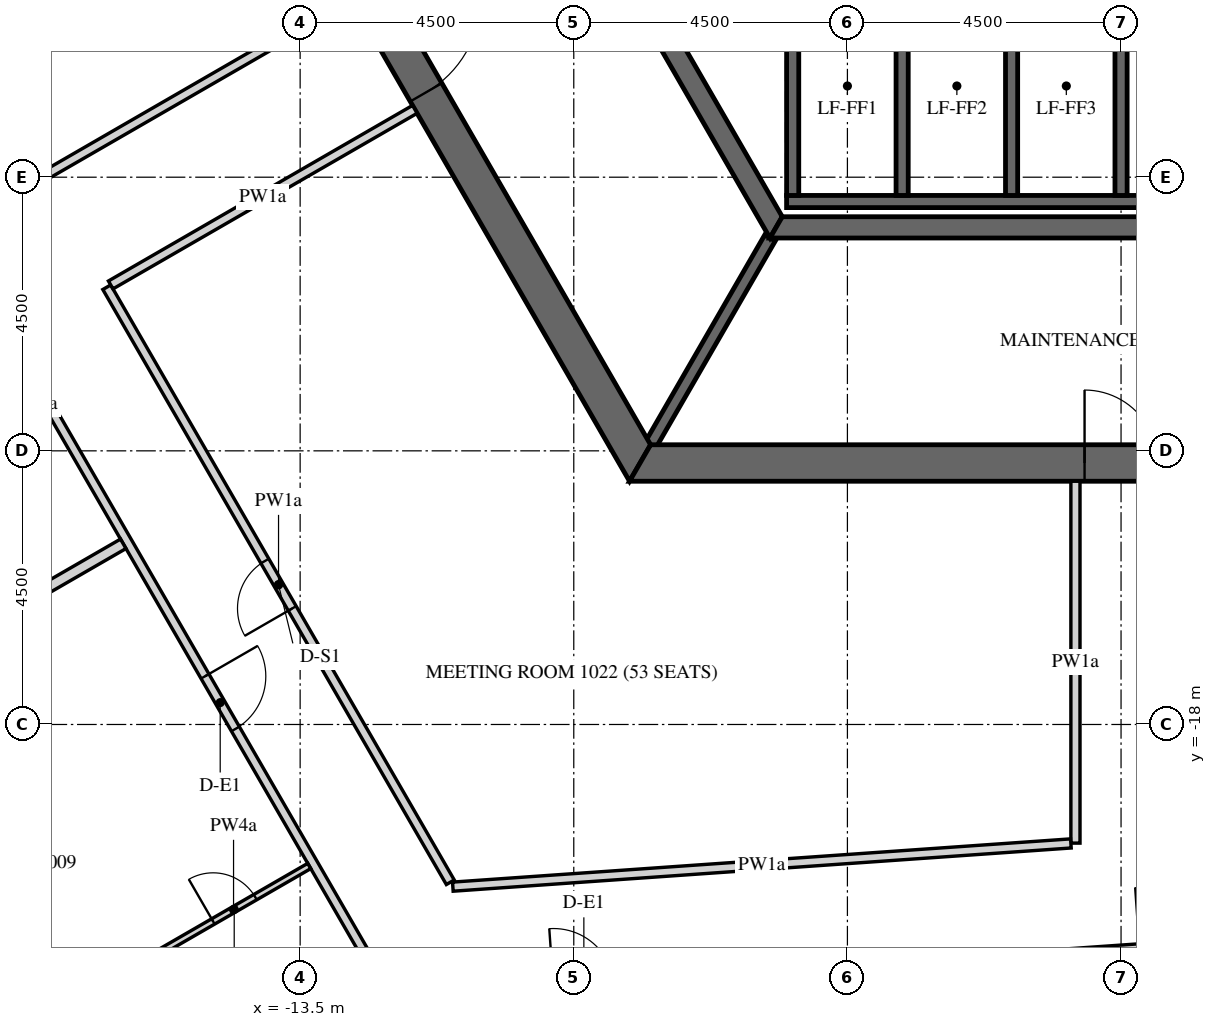
"""IFC4 building model, lengths in metres.
Left out: names, types, materials, properties, quantities, classifications, styles, units other than length and angle.
Written with IfcOpenShell. Run it as: python <this file> out.ifc"""

import sys

from ifc_helpers import new_model, si_unit, direction, frame, frame_2d, origin, place, context, subcontext, project, spatial, polyline, rectangle, outline, extrude, element, fill, save


model = new_model("IFC4")
c1 = context("Model", 3, precision=1e-05, world=origin(), true_north=direction((0.0, 1.0)))
c2 = subcontext(c1, "Body", "Model", "MODEL_VIEW")
j1 = project(units=[si_unit("LENGTHUNIT", "METRE"), si_unit("PLANEANGLEUNIT", "RADIAN")], contexts=[c1])
p1 = place(None, origin())
s1 = spatial("IfcSite", under=j1, at=p1, CompositionType="ELEMENT")
p2 = place(p1, origin())
s2 = spatial("IfcBuilding", under=s1, at=p2, CompositionType="ELEMENT")
p3 = place(p2, frame((0.0, 0.0, 142.8)))
s3 = spatial("IfcBuildingStorey", under=s2, at=p3, CompositionType="ELEMENT", Elevation=142.8)
p4 = place(p3, frame((-32.655, -2.89, -0.15), z_axis=(0.0, 0.0, 1.0), x_axis=(0.499997711317, -0.866026725152, 0.0)))
e1 = element("IfcWall", 1, at=p4, inside=s3, PredefinedType="SOLIDWALL", context=c2, shape_type="SweptSolid", body=[
    extrude(outline(polyline([(-0.022, -0.275), (30.097, -0.275), (30.045, 0.275), (0.022, 0.275), (-0.022, -0.275)])), origin(), (0.0, 0.0, 1.0), 3.75),
])
p5 = place(p4, frame((1.236, 0.0, 1.05)))
e2 = element("IfcOpeningElement", 2, at=p5, cuts=e1, PredefinedType="OPENING", context=c2, shape_type="SweptSolid", body=[
    extrude(rectangle(XDim=2.4, YDim=2.4, at=frame_2d((1.2, 1.2))), frame((0.0, 0.285, 0.0), z_axis=(0.0, -1.0, 0.0), x_axis=(1.0, 0.0, 0.0)), (0.0, 0.0, 1.0), 0.57),
])
p6 = place(p4, frame((4.835, 0.0, 1.05)))
e3 = element("IfcOpeningElement", 3, at=p6, cuts=e1, PredefinedType="OPENING", context=c2, shape_type="SweptSolid", body=[
    extrude(rectangle(XDim=2.4, YDim=2.4, at=frame_2d((1.2, 1.2))), frame((0.0, 0.285, 0.0), z_axis=(0.0, -1.0, 0.0), x_axis=(1.0, 0.0, 0.0)), (0.0, 0.0, 1.0), 0.57),
])
p7 = place(p4, frame((8.436, 0.0, 1.05)))
e4 = element("IfcOpeningElement", 4, at=p7, cuts=e1, PredefinedType="OPENING", context=c2, shape_type="SweptSolid", body=[
    extrude(rectangle(XDim=2.4, YDim=2.4, at=frame_2d((1.2, 1.2))), frame((0.0, 0.285, 0.0), z_axis=(0.0, -1.0, 0.0), x_axis=(1.0, 0.0, 0.0)), (0.0, 0.0, 1.0), 0.57),
])
p8 = place(p4, frame((12.035, 0.0, 1.05)))
e5 = element("IfcOpeningElement", 5, at=p8, cuts=e1, PredefinedType="OPENING", context=c2, shape_type="SweptSolid", body=[
    extrude(rectangle(XDim=2.4, YDim=2.4, at=frame_2d((1.2, 1.2))), frame((0.0, 0.285, 0.0), z_axis=(0.0, -1.0, 0.0), x_axis=(1.0, 0.0, 0.0)), (0.0, 0.0, 1.0), 0.57),
])
p9 = place(p4, frame((15.635, 0.0, 1.05)))
e6 = element("IfcOpeningElement", 6, at=p9, cuts=e1, PredefinedType="OPENING", context=c2, shape_type="SweptSolid", body=[
    extrude(rectangle(XDim=2.4, YDim=2.4, at=frame_2d((1.2, 1.2))), frame((0.0, 0.285, 0.0), z_axis=(0.0, -1.0, 0.0), x_axis=(1.0, 0.0, 0.0)), (0.0, 0.0, 1.0), 0.57),
])
p10 = place(p4, frame((19.236, 0.0, 1.05)))
e7 = element("IfcOpeningElement", 7, at=p10, cuts=e1, PredefinedType="OPENING", context=c2, shape_type="SweptSolid", body=[
    extrude(rectangle(XDim=2.4, YDim=2.4, at=frame_2d((1.2, 1.2))), frame((0.0, 0.285, 0.0), z_axis=(0.0, -1.0, 0.0), x_axis=(1.0, 0.0, 0.0)), (0.0, 0.0, 1.0), 0.57),
])
p11 = place(p4, frame((22.835, 0.0, 1.05)))
e8 = element("IfcOpeningElement", 8, at=p11, cuts=e1, PredefinedType="OPENING", context=c2, shape_type="SweptSolid", body=[
    extrude(rectangle(XDim=2.4, YDim=2.4, at=frame_2d((1.2, 1.2))), frame((0.0, 0.285, 0.0), z_axis=(0.0, -1.0, 0.0), x_axis=(1.0, 0.0, 0.0)), (0.0, 0.0, 1.0), 0.57),
])
p12 = place(p4, frame((26.436, 0.0, 1.05)))
e9 = element("IfcOpeningElement", 9, at=p12, cuts=e1, PredefinedType="OPENING", context=c2, shape_type="SweptSolid", body=[
    extrude(rectangle(XDim=2.4, YDim=2.4, at=frame_2d((1.2, 1.2))), frame((0.0, 0.285, 0.0), z_axis=(0.0, -1.0, 0.0), x_axis=(1.0, 0.0, 0.0)), (0.0, 0.0, 1.0), 0.57),
])
p13 = place(p3, frame((-15.819, 0.0, -0.15), z_axis=(0.0, 0.0, 1.0), x_axis=(0.499999880136, -0.866025472988, 0.0)))
e10 = element("IfcWall", 10, at=p13, inside=s3, PredefinedType="SHEAR", context=c2, shape_type="SweptSolid", body=[
    extrude(outline(polyline([(-0.173, -0.3), (15.993, -0.3), (15.646, 0.3), (0.173, 0.3), (-0.173, -0.3)])), origin(), (0.0, 0.0, 1.0), 3.75),
])
p14 = place(p13, frame((6.981, 0.0, 0.15)))
e11 = element("IfcOpeningElement", 11, at=p14, cuts=e10, PredefinedType="OPENING", context=c2, shape_type="SweptSolid", body=[
    extrude(rectangle(XDim=1.8, YDim=2.4, at=frame_2d((0.9, 1.2))), frame((0.0, 0.31, 0.0), z_axis=(0.0, -1.0, 0.0), x_axis=(1.0, 0.0, 0.0)), (0.0, 0.0, 1.0), 0.62),
])
p15 = place(p3, frame((-7.91, -13.7, -0.15), z_axis=(0.0, 0.0, 1.0), x_axis=(1.0, 0.0, 0.0)))
e12 = element("IfcWall", 12, at=p15, inside=s3, PredefinedType="SHEAR", context=c2, shape_type="SweptSolid", body=[
    extrude(outline(polyline([(-0.173, -0.3), (15.993, -0.3), (15.646, 0.3), (0.173, 0.3), (-0.173, -0.3)])), origin(), (0.0, 0.0, 1.0), 3.75),
])
p16 = place(p15, frame((7.31, 0.0, 0.15)))
e13 = element("IfcOpeningElement", 13, at=p16, cuts=e12, PredefinedType="OPENING", context=c2, shape_type="SweptSolid", body=[
    extrude(rectangle(XDim=1.2, YDim=2.4, at=frame_2d((0.6, 1.2))), frame((0.0, 0.31, 0.0), z_axis=(0.0, -1.0, 0.0), x_axis=(1.0, 0.0, 0.0)), (0.0, 0.0, 1.0), 0.62),
])
p17 = place(p3, frame((-11.345, 0.0, -0.15), z_axis=(0.0, 0.0, 1.0), x_axis=(0.499995046907, -0.866028263435, 0.0)))
e14 = element("IfcWall", 14, at=p17, inside=s3, PredefinedType="SHEAR", context=c2, shape_type="SweptSolid", body=[
    extrude(outline(polyline([(-0.101, -0.175), (11.446, -0.175), (11.244, 0.175), (0.101, 0.175), (-0.101, -0.175)])), origin(), (0.0, 0.0, 1.0), 3.75),
])
p18 = place(p17, frame((4.744, 0.0, 0.15)))
e15 = element("IfcOpeningElement", 15, at=p18, cuts=e14, PredefinedType="OPENING", context=c2, shape_type="SweptSolid", body=[
    extrude(rectangle(XDim=1.8, YDim=2.4, at=frame_2d((0.9, 1.2))), frame((0.0, 0.185, 0.0), z_axis=(0.0, -1.0, 0.0), x_axis=(1.0, 0.0, 0.0)), (0.0, 0.0, 1.0), 0.37),
])
p19 = place(p3, frame((-5.673, -9.825, -0.15), z_axis=(0.0, 0.0, 1.0), x_axis=(1.0, 0.0, 0.0)))
e16 = element("IfcWall", 16, at=p19, inside=s3, PredefinedType="SHEAR", context=c2, shape_type="SweptSolid", body=[
    extrude(outline(polyline([(-0.101, -0.175), (11.446, -0.175), (11.244, 0.175), (0.101, 0.175), (-0.101, -0.175)])), origin(), (0.0, 0.0, 1.0), 3.75),
])
p20 = place(p3, frame((-5.5, -9.4, -0.25), z_axis=(0.0, 0.0, 1.0), x_axis=(1.0, 0.0, 0.0)))
e17 = element("IfcWall", 17, at=p20, inside=s3, PredefinedType="SHEAR", context=c2, shape_type="SweptSolid", body=[
    extrude(rectangle(XDim=9.2, YDim=0.2, at=frame_2d((4.6, 0.0))), origin(), (0.0, 0.0, 1.0), 3.9),
])
for number, where, z_axis, x_axis in (
    (18, (-5.4, -9.3, -0.25), (0.0, 0.0, 1.0), (0.0, 1.0, 0.0)),
    (19, (-3.6, -9.3, -0.25), (0.0, 0.0, 1.0), (0.0, 1.0, 0.0)),
    (20, (-1.8, -9.3, -0.25), (0.0, 0.0, 1.0), (0.0, 1.0, 0.0)),
    (21, (0.0, -9.3, -0.25), (0.0, 0.0, 1.0), (0.0, 1.0, 0.0)),
):
    element("IfcWall", number, at=place(p3, frame(where, z_axis=z_axis, x_axis=x_axis)), inside=s3, PredefinedType="SHEAR", context=c2, shape_type="SweptSolid", body=[
        extrude(rectangle(XDim=2.9, YDim=0.2, at=frame_2d((1.45, 0.0))), origin(), (0.0, 0.0, 1.0), 3.9),
    ])
p21 = place(p3, frame((-5.773, -10.0, -0.15), z_axis=(0.0, 0.0, 1.0), x_axis=(-0.500038251005, -0.86600331843, 0.0)))
e22 = element("IfcWall", 22, at=p21, inside=s3, PredefinedType="SHEAR", context=c2, shape_type="SweptSolid", body=[
    extrude(rectangle(XDim=3.926, YDim=0.2, at=frame_2d((1.963, 0.0))), origin(), (0.0, 0.0, 1.0), 3.75),
])
p22 = place(p3, frame((-23.743, -2.175, 0.0), z_axis=(0.0, 0.0, 1.0), x_axis=(0.499992353047, -0.86602981871, 0.0)))
e23 = element("IfcWall", 23, at=p22, inside=s3, PredefinedType="PARTITIONING", context=c2, shape_type="SweptSolid", body=[
    extrude(rectangle(XDim=23.516, YDim=0.15, at=frame_2d((11.758, 0.0))), origin(), (0.0, 0.0, 1.0), 2.838),
])
p23 = place(p22, frame((10.099, 0.0, 0.0)))
e24 = element("IfcOpeningElement", 24, at=p23, cuts=e23, PredefinedType="OPENING", context=c2, shape_type="SweptSolid", body=[
    extrude(rectangle(XDim=1.0, YDim=2.1, at=frame_2d((0.5, 1.05))), frame((0.0, 0.085, 0.0), z_axis=(0.0, -1.0, 0.0), x_axis=(1.0, 0.0, 0.0)), (0.0, 0.0, 1.0), 0.17),
])
p24 = place(p22, frame((17.358, 0.0, 0.0)))
e25 = element("IfcOpeningElement", 25, at=p24, cuts=e23, PredefinedType="OPENING", context=c2, shape_type="SweptSolid", body=[
    extrude(rectangle(XDim=1.0, YDim=2.1, at=frame_2d((0.5, 1.05))), frame((0.0, 0.085, 0.0), z_axis=(0.0, -1.0, 0.0), x_axis=(1.0, 0.0, 0.0)), (0.0, 0.0, 1.0), 0.17),
])
p25 = place(p3, frame((-11.902, -22.535, 0.0), z_axis=(0.0, 0.0, 1.0), x_axis=(0.997563830208, 0.069759620556, 0.0)))
e26 = element("IfcWall", 26, at=p25, inside=s3, PredefinedType="PARTITIONING", context=c2, shape_type="SweptSolid", body=[
    extrude(rectangle(XDim=19.434, YDim=0.15, at=frame_2d((9.717, 0.0))), origin(), (0.0, 0.0, 1.0), 2.838),
])
p26 = place(p25, frame((2.575, 0.0, 0.0)))
e27 = element("IfcOpeningElement", 27, at=p26, cuts=e26, PredefinedType="OPENING", context=c2, shape_type="SweptSolid", body=[
    extrude(rectangle(XDim=1.0, YDim=2.1, at=frame_2d((0.5, 1.05))), frame((0.0, 0.085, 0.0), z_axis=(0.0, -1.0, 0.0), x_axis=(1.0, 0.0, 0.0)), (0.0, 0.0, 1.0), 0.17),
])
p27 = place(p25, frame((12.234, 0.0, 0.0)))
e28 = element("IfcOpeningElement", 28, at=p27, cuts=e26, PredefinedType="OPENING", context=c2, shape_type="SweptSolid", body=[
    extrude(rectangle(XDim=1.0, YDim=2.1, at=frame_2d((0.5, 1.05))), frame((0.0, 0.085, 0.0), z_axis=(0.0, -1.0, 0.0), x_axis=(1.0, 0.0, 0.0)), (0.0, 0.0, 1.0), 0.17),
])
p28 = place(p3, frame((-12.664, -6.066, 0.0), z_axis=(0.0, 0.0, 1.0), x_axis=(-0.866018092707, -0.500012662943, 0.0)))
e29 = element("IfcWall", 29, at=p28, inside=s3, PredefinedType="PARTITIONING", context=c2, shape_type="SweptSolid", body=[
    extrude(rectangle(XDim=5.85, YDim=0.15, at=frame_2d((2.925, 0.0))), origin(), (0.0, 0.0, 1.0), 2.838),
])
p29 = place(p3, frame((-0.75, -14.0, 0.0), z_axis=(0.0, 0.0, 1.0), x_axis=(0.0, -1.0, 0.0)))
e30 = element("IfcWall", 30, at=p29, inside=s3, PredefinedType="PARTITIONING", context=c2, shape_type="SweptSolid", body=[
    extrude(rectangle(XDim=5.951, YDim=0.15, at=frame_2d((2.976, 0.0))), origin(), (0.0, 0.0, 1.0), 2.838),
])
p30 = place(p3, frame((-0.825, -19.956, 0.0), z_axis=(0.0, 0.0, 1.0), x_axis=(-0.997562587881, -0.069777383582, 0.0)))
e31 = element("IfcWall", 31, at=p30, inside=s3, PredefinedType="PARTITIONING", context=c2, shape_type="SweptSolid", body=[
    extrude(rectangle(XDim=10.189, YDim=0.15, at=frame_2d((5.094, 0.0))), origin(), (0.0, 0.0, 1.0), 2.838),
])
p31 = place(p3, frame((-11.031, -20.595, 0.0), z_axis=(0.0, 0.0, 1.0), x_axis=(-0.499987422378, 0.866032665356, 0.0)))
e32 = element("IfcWall", 32, at=p31, inside=s3, PredefinedType="PARTITIONING", context=c2, shape_type="SweptSolid", body=[
    extrude(rectangle(XDim=11.299, YDim=0.15, at=frame_2d((5.649, 0.0))), origin(), (0.0, 0.0, 1.0), 2.838),
])
p32 = place(p31, frame((5.199, 0.0, 0.0)))
e33 = element("IfcOpeningElement", 33, at=p32, cuts=e32, PredefinedType="OPENING", context=c2, shape_type="SweptSolid", body=[
    extrude(rectangle(XDim=0.9, YDim=2.1, at=frame_2d((0.45, 1.05))), frame((0.0, 0.085, 0.0), z_axis=(0.0, -1.0, 0.0), x_axis=(1.0, 0.0, 0.0)), (0.0, 0.0, 1.0), 0.17),
])
p33 = place(p3, frame((-16.615, -10.772, 0.0), z_axis=(0.0, 0.0, 1.0), x_axis=(0.866025774745, 0.499999357477, 0.0)))
e34 = element("IfcWall", 34, at=p33, inside=s3, PredefinedType="PARTITIONING", context=c2, shape_type="SweptSolid", body=[
    extrude(rectangle(XDim=5.775, YDim=0.15, at=frame_2d((2.887, 0.0))), origin(), (0.0, 0.0, 1.0), 2.838),
])
p34 = place(p3, frame((-23.099, -18.892, 0.0), z_axis=(0.0, 0.0, 1.0), x_axis=(0.866019273868, 0.500010617176, 0.0)))
e35 = element("IfcWall", 35, at=p34, inside=s3, PredefinedType="PARTITIONING", context=c2, shape_type="SweptSolid", body=[
    extrude(rectangle(XDim=7.725, YDim=0.18, at=frame_2d((3.862, 0.0))), origin(), (0.0, 0.0, 1.0), 2.838),
])
p35 = place(p3, frame((-15.84, -21.764, 0.0), z_axis=(0.0, 0.0, 1.0), x_axis=(0.866039941686, 0.499974818771, 0.0)))
e36 = element("IfcWall", 36, at=p35, inside=s3, PredefinedType="PARTITIONING", context=c2, shape_type="SweptSolid", body=[
    extrude(rectangle(XDim=2.875, YDim=0.1, at=frame_2d((1.438, 0.0))), origin(), (0.0, 0.0, 1.0), 2.838),
])
p36 = place(p35, frame((1.05, 0.0, 0.0)))
e37 = element("IfcOpeningElement", 37, at=p36, cuts=e36, PredefinedType="OPENING", context=c2, shape_type="SweptSolid", body=[
    extrude(rectangle(XDim=0.8, YDim=2.1, at=frame_2d((0.4, 1.05))), frame((0.0, 0.06, 0.0), z_axis=(0.0, -1.0, 0.0), x_axis=(1.0, 0.0, 0.0)), (0.0, 0.0, 1.0), 0.12),
])
p37 = place(p14, origin())
e38 = element("IfcDoor", 38, at=p37, inside=s3, OperationType="DOUBLE_DOOR_SINGLE_SWING", PredefinedType="DOOR", context=c2, shape_type="SweptSolid", body=[
    extrude(rectangle(XDim=1.8, YDim=2.4, at=frame_2d((0.9, 1.2))), frame((0.0, 0.025, 0.0), z_axis=(0.0, -1.0, 0.0), x_axis=(1.0, 0.0, 0.0)), (0.0, 0.0, 1.0), 0.05),
])
fill(e11, e38)
p38 = place(p16, origin())
e39 = element("IfcDoor", 39, at=p38, inside=s3, OperationType="SINGLE_SWING_LEFT", PredefinedType="DOOR", context=c2, shape_type="SweptSolid", body=[
    extrude(rectangle(XDim=1.2, YDim=2.4, at=frame_2d((0.6, 1.2))), frame((0.0, 0.025, 0.0), z_axis=(0.0, -1.0, 0.0), x_axis=(1.0, 0.0, 0.0)), (0.0, 0.0, 1.0), 0.05),
])
fill(e13, e39)
p39 = place(p24, origin())
e40 = element("IfcDoor", 40, at=p39, inside=s3, OperationType="SINGLE_SWING_RIGHT", PredefinedType="DOOR", context=c2, shape_type="SweptSolid", body=[
    extrude(rectangle(XDim=1.0, YDim=2.1, at=frame_2d((0.5, 1.05))), frame((0.0, 0.025, 0.0), z_axis=(0.0, -1.0, 0.0), x_axis=(1.0, 0.0, 0.0)), (0.0, 0.0, 1.0), 0.05),
])
fill(e25, e40)
p40 = place(p36, origin())
e41 = element("IfcDoor", 41, at=p40, inside=s3, OperationType="SINGLE_SWING_LEFT", PredefinedType="DOOR", context=c2, shape_type="SweptSolid", body=[
    extrude(rectangle(XDim=0.8, YDim=2.1, at=frame_2d((0.4, 1.05))), frame((0.0, 0.025, 0.0), z_axis=(0.0, -1.0, 0.0), x_axis=(1.0, 0.0, 0.0)), (0.0, 0.0, 1.0), 0.05),
])
fill(e37, e41)
p41 = place(p32, origin())
e42 = element("IfcDoor", 42, at=p41, inside=s3, OperationType="SINGLE_SWING_RIGHT", PredefinedType="DOOR", context=c2, shape_type="SweptSolid", body=[
    extrude(rectangle(XDim=0.9, YDim=2.1, at=frame_2d((0.45, 1.05))), frame((0.0, 0.025, 0.0), z_axis=(0.0, -1.0, 0.0), x_axis=(1.0, 0.0, 0.0)), (0.0, 0.0, 1.0), 0.05),
])
fill(e33, e42)
save(model, sys.argv[1])
